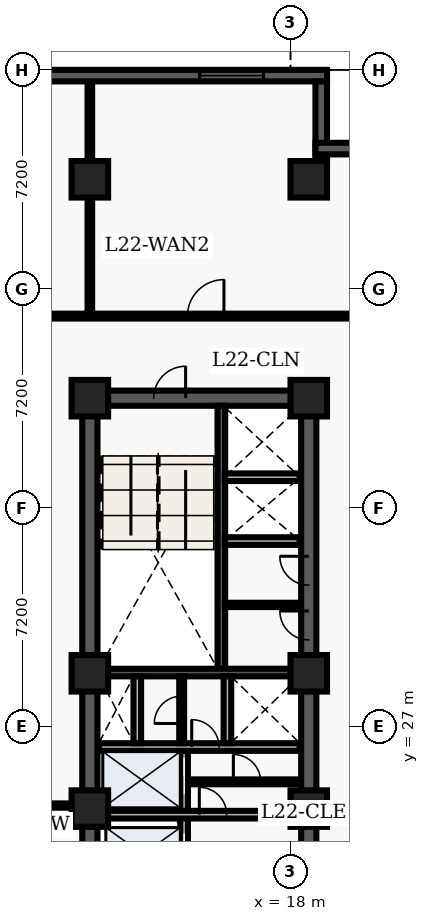
"""IFC4 building model, lengths in metres.
Left out: names, types, materials, properties, quantities, classifications, styles, units other than length and angle.
Written with IfcOpenShell. Run it as: python <this file> out.ifc"""

import sys

from ifc_helpers import new_model, entity, si_unit, converted_unit, direction, frame, origin_with_axes, origin_2d_with_axis, place, context, subcontext, project, spatial, polyline, rectangle, outline, extrude, element, fill, save


model = new_model("IFC4")
c1 = context("Model", 3, precision=1e-05, world=origin_with_axes(), true_north=direction((0.0, 1.0)))
c2 = subcontext(c1, "Body", "Model", "MODEL_VIEW")
j1 = project(units=[si_unit("LENGTHUNIT", "METRE"), converted_unit("PLANEANGLEUNIT", "DEGREE", entity("IfcPlaneAngleMeasure", 0.017), si_unit("PLANEANGLEUNIT", "RADIAN"), dimensions=[0, 0, 0, 0, 0, 0, 0])], contexts=[c1])
p1 = place(None, origin_with_axes())
s1 = spatial("IfcSite", under=j1, at=p1, CompositionType="ELEMENT")
p2 = place(p1, origin_with_axes())
s2 = spatial("IfcBuilding", under=s1, at=p2, CompositionType="ELEMENT")
p3 = place(p2, frame((0.0, 0.0, 93.0), z_axis=(0.0, 0.0, 1.0), x_axis=(1.0, 0.0, 0.0)))
s3 = spatial("IfcBuildingStorey", under=s2, at=p3, CompositionType="ELEMENT", Elevation=93.0)
p4 = place(p3, frame((11.4, 10.8, 0.0), z_axis=(0.0, 0.0, 1.0), x_axis=(0.0, 1.0, 0.0)))
e1 = element("IfcWall", 1, at=p4, inside=s3, PredefinedType="SHEAR", context=c2, shape_type="SweptSolid", body=[
    extrude(outline(polyline([(0.0, -0.25), (27.0, -0.25), (27.0, 0.25), (0.0, 0.25), (0.0, -0.25)])), origin_with_axes(), (0.0, 0.0, 1.0), 3.66),
])
p5 = place(p3, frame((11.4, 37.8, 0.0), z_axis=(0.0, 0.0, 1.0), x_axis=(1.0, 0.0, 0.0)))
e2 = element("IfcWall", 2, at=p5, inside=s3, PredefinedType="SHEAR", context=c2, shape_type="SweptSolid", body=[
    extrude(outline(polyline([(0.0, -0.25), (7.2, -0.25), (7.2, 0.25), (0.0, 0.25), (0.0, -0.25)])), origin_with_axes(), (0.0, 0.0, 1.0), 3.66),
])
p6 = place(p5, frame((2.625, 0.0, 0.0), z_axis=(0.0, 0.0, 1.0), x_axis=(1.0, 0.0, 0.0)))
e3 = element("IfcOpeningElement", 3, at=p6, cuts=e2, PredefinedType="OPENING", context=c2, shape_type="SweptSolid", body=[
    extrude(rectangle(XDim=1.05, YDim=0.52, at=origin_2d_with_axis()), origin_with_axes(), (0.0, 0.0, 1.0), 2.15),
])
p7 = place(p3, frame((18.6, 10.8, 0.0), z_axis=(0.0, 0.0, 1.0), x_axis=(0.0, 1.0, 0.0)))
e4 = element("IfcWall", 4, at=p7, inside=s3, PredefinedType="SHEAR", context=c2, shape_type="SweptSolid", body=[
    extrude(outline(polyline([(0.0, -0.25), (13.5, -0.25), (13.5, 0.25), (0.0, 0.25), (0.0, -0.25)])), origin_with_axes(), (0.0, 0.0, 1.0), 3.66),
])
p8 = place(p7, frame((11.125, 0.0, 0.0), z_axis=(0.0, 0.0, 1.0), x_axis=(1.0, 0.0, 0.0)))
e5 = element("IfcOpeningElement", 5, at=p8, cuts=e4, PredefinedType="OPENING", context=c2, shape_type="SweptSolid", body=[
    extrude(rectangle(XDim=1.05, YDim=0.52, at=origin_2d_with_axis()), origin_with_axes(), (0.0, 0.0, 1.0), 2.15),
])
p9 = place(p7, frame((2.575, 0.0, 0.0), z_axis=(0.0, 0.0, 1.0), x_axis=(1.0, 0.0, 0.0)))
e6 = element("IfcOpeningElement", 6, at=p9, cuts=e4, PredefinedType="OPENING", context=c2, shape_type="SweptSolid", body=[
    extrude(rectangle(XDim=0.95, YDim=0.52, at=origin_2d_with_axis()), origin_with_axes(), (0.0, 0.0, 1.0), 2.15),
])
p10 = place(p3, frame((18.6, 24.3, 0.0), z_axis=(0.0, 0.0, 1.0), x_axis=(0.0, 1.0, 0.0)))
e7 = element("IfcWall", 7, at=p10, inside=s3, PredefinedType="SHEAR", context=c2, shape_type="SweptSolid", body=[
    extrude(outline(polyline([(0.0, -0.25), (13.5, -0.25), (13.5, 0.25), (0.0, 0.25), (0.0, -0.25)])), origin_with_axes(), (0.0, 0.0, 1.0), 3.66),
])
p11 = place(p10, frame((6.025, 0.0, 0.0), z_axis=(0.0, 0.0, 1.0), x_axis=(1.0, 0.0, 0.0)))
e8 = element("IfcOpeningElement", 8, at=p11, cuts=e7, PredefinedType="OPENING", context=c2, shape_type="SweptSolid", body=[
    extrude(rectangle(XDim=0.95, YDim=0.52, at=origin_2d_with_axis()), origin_with_axes(), (0.0, 0.0, 1.0), 2.15),
])
p12 = place(p10, frame((7.825, 0.0, 0.0), z_axis=(0.0, 0.0, 1.0), x_axis=(1.0, 0.0, 0.0)))
e9 = element("IfcOpeningElement", 9, at=p12, cuts=e7, PredefinedType="OPENING", context=c2, shape_type="SweptSolid", body=[
    extrude(rectangle(XDim=0.95, YDim=0.52, at=origin_2d_with_axis()), origin_with_axes(), (0.0, 0.0, 1.0), 2.15),
])
p13 = place(p3, frame((15.725, 28.9, 0.0), z_axis=(0.0, 0.0, 1.0), x_axis=(0.0, 1.0, 0.0)))
e10 = element("IfcWall", 10, at=p13, inside=s3, PredefinedType="SHEAR", context=c2, shape_type="SweptSolid", body=[
    extrude(outline(polyline([(0.0, -0.125), (8.65, -0.125), (8.65, 0.125), (0.0, 0.125), (0.0, -0.125)])), origin_with_axes(), (0.0, 0.0, 1.0), 3.66),
])
p14 = place(p3, frame((11.65, 28.775, 0.0), z_axis=(0.0, 0.0, 1.0), x_axis=(1.0, 0.0, 0.0)))
e11 = element("IfcWall", 11, at=p14, inside=s3, PredefinedType="SHEAR", context=c2, shape_type="SweptSolid", body=[
    extrude(outline(polyline([(0.0, -0.125), (6.7, -0.125), (6.7, 0.125), (0.0, 0.125), (0.0, -0.125)])), origin_with_axes(), (0.0, 0.0, 1.0), 3.66),
])
p15 = place(p3, frame((14.5, 19.95, 0.0), z_axis=(0.0, 0.0, 1.0), x_axis=(0.0, 1.0, 0.0)))
e12 = element("IfcWall", 12, at=p15, inside=s3, PredefinedType="SOLIDWALL", context=c2, shape_type="SweptSolid", body=[
    extrude(outline(polyline([(0.0, -0.125), (6.25, -0.125), (6.25, 0.125), (0.0, 0.125), (0.0, -0.125)])), origin_with_axes(), (0.0, 0.0, 1.0), 2.7),
])
p16 = place(p15, frame((1.025, 0.0, 0.0), z_axis=(0.0, 0.0, 1.0), x_axis=(1.0, 0.0, 0.0)))
e13 = element("IfcOpeningElement", 13, at=p16, cuts=e12, PredefinedType="OPENING", context=c2, shape_type="SweptSolid", body=[
    extrude(rectangle(XDim=1.1, YDim=0.27, at=origin_2d_with_axis()), origin_with_axes(), (0.0, 0.0, 1.0), 2.15),
])
p17 = place(p15, frame((2.975, 0.0, 0.0), z_axis=(0.0, 0.0, 1.0), x_axis=(1.0, 0.0, 0.0)))
e14 = element("IfcOpeningElement", 14, at=p17, cuts=e12, PredefinedType="OPENING", context=c2, shape_type="SweptSolid", body=[
    extrude(rectangle(XDim=1.1, YDim=0.27, at=origin_2d_with_axis()), origin_with_axes(), (0.0, 0.0, 1.0), 2.15),
])
p18 = place(p15, frame((5.425, 0.0, 0.0), z_axis=(0.0, 0.0, 1.0), x_axis=(1.0, 0.0, 0.0)))
e15 = element("IfcOpeningElement", 15, at=p18, cuts=e12, PredefinedType="OPENING", context=c2, shape_type="SweptSolid", body=[
    extrude(rectangle(XDim=1.2, YDim=0.27, at=origin_2d_with_axis()), origin_with_axes(), (0.0, 0.0, 1.0), 2.15),
])
p19 = place(p3, frame((11.7, 24.1, 0.0), z_axis=(0.0, 0.0, 1.0), x_axis=(1.0, 0.0, 0.0)))
e16 = element("IfcWall", 16, at=p19, inside=s3, PredefinedType="SOLIDWALL", context=c2, shape_type="SweptSolid", body=[
    extrude(outline(polyline([(0.0, -0.125), (6.6, -0.125), (6.6, 0.125), (0.0, 0.125), (0.0, -0.125)])), origin_with_axes(), (0.0, 0.0, 1.0), 2.7),
])
p20 = place(p19, frame((3.75, 0.0, 0.0), z_axis=(0.0, 0.0, 1.0), x_axis=(1.0, 0.0, 0.0)))
e17 = element("IfcOpeningElement", 17, at=p20, cuts=e16, PredefinedType="OPENING", context=c2, shape_type="SweptSolid", body=[
    extrude(rectangle(XDim=0.9, YDim=0.27, at=origin_2d_with_axis()), origin_with_axes(), (0.0, 0.0, 1.0), 2.15),
])
p21 = place(p3, frame((11.7, 26.325, 0.0), z_axis=(0.0, 0.0, 1.0), x_axis=(1.0, 0.0, 0.0)))
e18 = element("IfcWall", 18, at=p21, inside=s3, PredefinedType="SOLIDWALL", context=c2, shape_type="SweptSolid", body=[
    extrude(outline(polyline([(0.0, -0.125), (6.6, -0.125), (6.6, 0.125), (0.0, 0.125), (0.0, -0.125)])), origin_with_axes(), (0.0, 0.0, 1.0), 2.7),
])
p22 = place(p21, frame((3.5, 0.0, 0.0), z_axis=(0.0, 0.0, 1.0), x_axis=(1.0, 0.0, 0.0)))
e19 = element("IfcOpeningElement", 19, at=p22, cuts=e18, PredefinedType="OPENING", context=c2, shape_type="SweptSolid", body=[
    extrude(rectangle(XDim=0.9, YDim=0.27, at=origin_2d_with_axis()), origin_with_axes(), (0.0, 0.0, 1.0), 2.15),
])
for number, where, z_axis, x_axis in (
    (20, (12.96, 26.45, 0.0), (0.0, 0.0, 1.0), (0.0, 1.0, 0.0)),
    (21, (15.925, 26.45, 0.0), (0.0, 0.0, 1.0), (0.0, 1.0, 0.0)),
):
    element("IfcWall", number, at=place(p3, frame(where, z_axis=z_axis, x_axis=x_axis)), inside=s3, PredefinedType="SOLIDWALL", context=c2, shape_type="SweptSolid", body=[
        extrude(outline(polyline([(0.0, -0.125), (2.2, -0.125), (2.2, 0.125), (0.0, 0.125), (0.0, -0.125)])), origin_with_axes(), (0.0, 0.0, 1.0), 2.7),
    ])
for number, where, z_axis, x_axis in (
    (22, (11.4, 24.3, 0.0), (0.0, 0.0, 1.0), (1.0, 0.0, 0.0)),
    (23, (11.4, 28.75, 0.0), (0.0, 0.0, 1.0), (1.0, 0.0, 0.0)),
    (24, (11.4, 37.8, 0.0), (0.0, 0.0, 1.0), (1.0, 0.0, 0.0)),
    (25, (11.4, 45.0, 0.0), (0.0, 0.0, 1.0), (1.0, 0.0, 0.0)),
    (26, (18.6, 24.3, 0.0), (0.0, 0.0, 1.0), (1.0, 0.0, 0.0)),
    (27, (18.6, 28.75, 0.0), (0.0, 0.0, 1.0), (1.0, 0.0, 0.0)),
    (28, (18.6, 37.8, 0.0), (0.0, 0.0, 1.0), (1.0, 0.0, 0.0)),
    (29, (18.6, 45.0, 0.0), (0.0, 0.0, 1.0), (1.0, 0.0, 0.0)),
):
    element("IfcColumn", number, at=place(p3, frame(where, z_axis=z_axis, x_axis=x_axis)), inside=s3, PredefinedType="COLUMN", context=c2, shape_type="SweptSolid", body=[
        extrude(rectangle(XDim=1.2, YDim=1.2, at=origin_2d_with_axis()), origin_with_axes(), (0.0, 0.0, 1.0), 3.9),
    ])
p23 = place(p3, frame((14.62, 25.18, 0.0), z_axis=(0.0, 0.0, 1.0), x_axis=(1.0, 0.0, 0.0)))
e30 = element("IfcWall", 30, at=p23, inside=s3, PredefinedType="PARTITIONING", context=c2, shape_type="SweptSolid", body=[
    extrude(outline(polyline([(0.0, -0.08), (3.68, -0.08), (3.68, 0.08), (0.0, 0.08), (0.0, -0.08)])), origin_with_axes(), (0.0, 0.0, 1.0), 2.7),
])
p24 = place(p23, frame((1.95, 0.0, 0.0), z_axis=(0.0, 0.0, 1.0), x_axis=(1.0, 0.0, 0.0)))
e31 = element("IfcOpeningElement", 31, at=p24, cuts=e30, PredefinedType="OPENING", context=c2, shape_type="SweptSolid", body=[
    extrude(rectangle(XDim=0.9, YDim=0.18, at=origin_2d_with_axis()), origin_with_axes(), (0.0, 0.0, 1.0), 2.15),
])
p25 = place(p3, frame((14.42, 26.45, 0.0), z_axis=(0.0, 0.0, 1.0), x_axis=(0.0, 1.0, 0.0)))
e32 = element("IfcWall", 32, at=p25, inside=s3, PredefinedType="PARTITIONING", context=c2, shape_type="SweptSolid", body=[
    extrude(outline(polyline([(0.0, -0.08), (2.2, -0.08), (2.2, 0.08), (0.0, 0.08), (0.0, -0.08)])), origin_with_axes(), (0.0, 0.0, 1.0), 2.7),
])
p26 = place(p25, frame((1.1, 0.0, 0.0), z_axis=(0.0, 0.0, 1.0), x_axis=(1.0, 0.0, 0.0)))
e33 = element("IfcOpeningElement", 33, at=p26, cuts=e32, PredefinedType="OPENING", context=c2, shape_type="SweptSolid", body=[
    extrude(rectangle(XDim=0.9, YDim=0.18, at=origin_2d_with_axis()), origin_with_axes(), (0.0, 0.0, 1.0), 2.15),
])
for number, where, z_axis, x_axis in (
    (34, (15.84, 33.1, 0.0), (0.0, 0.0, 1.0), (1.0, 0.0, 0.0)),
    (35, (15.84, 35.2, 0.0), (0.0, 0.0, 1.0), (1.0, 0.0, 0.0)),
):
    element("IfcWall", number, at=place(p3, frame(where, z_axis=z_axis, x_axis=x_axis)), inside=s3, PredefinedType="SOLIDWALL", context=c2, shape_type="SweptSolid", body=[
        extrude(outline(polyline([(0.0, -0.125), (2.46, -0.125), (2.46, 0.125), (0.0, 0.125), (0.0, -0.125)])), origin_with_axes(), (0.0, 0.0, 1.0), 2.7),
    ])
p27 = place(p3, frame((15.84, 31.0, 0.0), z_axis=(0.0, 0.0, 1.0), x_axis=(1.0, 0.0, 0.0)))
e36 = element("IfcWall", 36, at=p27, inside=s3, PredefinedType="PARTITIONING", context=c2, shape_type="SweptSolid", body=[
    extrude(outline(polyline([(0.0, -0.07), (2.46, -0.07), (2.46, 0.07), (0.0, 0.07), (0.0, -0.07)])), origin_with_axes(), (0.0, 0.0, 1.0), 2.7),
])
p28 = place(p3, frame((9.52, 24.4, 0.0), z_axis=(0.0, 0.0, 1.0), x_axis=(1.0, 0.0, 0.0)))
e37 = element("IfcWall", 37, at=p28, inside=s3, PredefinedType="PARTITIONING", context=c2, shape_type="SweptSolid", body=[
    extrude(outline(polyline([(0.0, -0.07), (1.58, -0.07), (1.58, 0.07), (0.0, 0.07), (0.0, -0.07)])), origin_with_axes(), (0.0, 0.0, 1.0), 2.7),
])
p29 = place(p3, frame((2.6, 40.5, 0.0), z_axis=(0.0, 0.0, 1.0), x_axis=(1.0, 0.0, 0.0)))
e38 = element("IfcWall", 38, at=p29, inside=s3, PredefinedType="PARTITIONING", context=c2, shape_type="SweptSolid", body=[
    extrude(outline(polyline([(0.0, -0.08), (18.65, -0.08), (18.65, 0.08), (0.0, 0.08), (0.0, -0.08)])), origin_with_axes(), (0.0, 0.0, 1.0), 2.7),
])
p30 = place(p29, frame((5.275, 0.0, 0.0), z_axis=(0.0, 0.0, 1.0), x_axis=(1.0, 0.0, 0.0)))
e39 = element("IfcOpeningElement", 39, at=p30, cuts=e38, PredefinedType="OPENING", context=c2, shape_type="SweptSolid", body=[
    extrude(rectangle(XDim=1.0, YDim=0.18, at=origin_2d_with_axis()), origin_with_axes(), (0.0, 0.0, 1.0), 2.15),
])
p31 = place(p29, frame((12.61, 0.0, 0.0), z_axis=(0.0, 0.0, 1.0), x_axis=(1.0, 0.0, 0.0)))
e40 = element("IfcOpeningElement", 40, at=p31, cuts=e38, PredefinedType="OPENING", context=c2, shape_type="SweptSolid", body=[
    extrude(rectangle(XDim=1.2, YDim=0.18, at=origin_2d_with_axis()), origin_with_axes(), (0.0, 0.0, 1.0), 2.2),
])
p32 = place(p3, frame((11.4, 40.6, 0.0), z_axis=(0.0, 0.0, 1.0), x_axis=(0.0, 1.0, 0.0)))
e41 = element("IfcWall", 41, at=p32, inside=s3, PredefinedType="PARTITIONING", context=c2, shape_type="SweptSolid", body=[
    extrude(outline(polyline([(0.0, -0.075), (7.64, -0.075), (7.64, 0.075), (0.0, 0.075), (0.0, -0.075)])), origin_with_axes(), (0.0, 0.0, 1.0), 2.7),
])
p33 = place(p3, frame((2.78, 48.41, 0.0), z_axis=(0.0, 0.0, 1.0), x_axis=(1.0, 0.0, 0.0)))
e42 = element("IfcWall", 42, at=p33, inside=s3, PredefinedType="SOLIDWALL", context=c2, shape_type="SweptSolid", body=[
    extrude(outline(polyline([(0.0, -0.19), (16.42, -0.19), (16.42, 0.19), (0.0, 0.19), (0.0, -0.19)])), origin_with_axes(), (0.0, 0.0, 1.0), 3.66),
])
p34 = place(p33, frame((3.137, 0.0, 0.45), z_axis=(0.0, 0.0, 1.0), x_axis=(1.0, 0.0, 0.0)))
e43 = element("IfcOpeningElement", 43, at=p34, cuts=e42, PredefinedType="OPENING", context=c2, shape_type="SweptSolid", body=[
    extrude(rectangle(XDim=2.1, YDim=0.4, at=origin_2d_with_axis()), origin_with_axes(), (0.0, 0.0, 1.0), 2.2),
])
p35 = place(p33, frame((13.283, 0.0, 0.45), z_axis=(0.0, 0.0, 1.0), x_axis=(1.0, 0.0, 0.0)))
e44 = element("IfcOpeningElement", 44, at=p35, cuts=e42, PredefinedType="OPENING", context=c2, shape_type="SweptSolid", body=[
    extrude(rectangle(XDim=2.1, YDim=0.4, at=origin_2d_with_axis()), origin_with_axes(), (0.0, 0.0, 1.0), 2.2),
])
p36 = place(p3, frame((19.01, 48.22, 0.0), z_axis=(0.0, 0.0, 1.0), x_axis=(0.0, -1.0, 0.0)))
e45 = element("IfcWall", 45, at=p36, inside=s3, PredefinedType="SOLIDWALL", context=c2, shape_type="SweptSolid", body=[
    extrude(outline(polyline([(0.0, -0.19), (2.56, -0.19), (2.56, 0.19), (0.0, 0.19), (0.0, -0.19)])), origin_with_axes(), (0.0, 0.0, 1.0), 3.66),
])
p37 = place(p3, frame((18.82, 46.01, 0.0), z_axis=(0.0, 0.0, 1.0), x_axis=(1.0, 0.0, 0.0)))
e46 = element("IfcWall", 46, at=p37, inside=s3, PredefinedType="SOLIDWALL", context=c2, shape_type="SweptSolid", body=[
    extrude(outline(polyline([(0.0, -0.19), (2.78, -0.19), (2.78, 0.19), (0.0, 0.19), (0.0, -0.19)])), origin_with_axes(), (0.0, 0.0, 1.0), 3.66),
])
p38 = place(p15, frame((2.975, 0.0, 0.0), z_axis=(0.0, 0.0, 1.0), x_axis=(1.0, 0.0, 0.0)))
e47 = element("IfcDoor", 47, at=p38, inside=s3, OperationType="SLIDING_TO_RIGHT", PredefinedType="DOOR", context=c2, shape_type="SweptSolid", body=[
    extrude(rectangle(XDim=1.1, YDim=0.09, at=origin_2d_with_axis()), origin_with_axes(), (0.0, 0.0, 1.0), 2.15),
])
fill(e14, e47)
p39 = place(p15, frame((5.425, 0.0, 0.0), z_axis=(0.0, 0.0, 1.0), x_axis=(1.0, 0.0, 0.0)))
e48 = element("IfcDoor", 48, at=p39, inside=s3, OperationType="DOUBLE_DOOR_SLIDING", PredefinedType="DOOR", context=c2, shape_type="SweptSolid", body=[
    extrude(rectangle(XDim=1.2, YDim=0.09, at=origin_2d_with_axis()), origin_with_axes(), (0.0, 0.0, 1.0), 2.15),
])
fill(e15, e48)
p40 = place(p5, frame((2.625, 0.0, 0.0), z_axis=(0.0, 0.0, 1.0), x_axis=(1.0, 0.0, 0.0)))
e49 = element("IfcDoor", 49, at=p40, inside=s3, OperationType="SINGLE_SWING_RIGHT", PredefinedType="DOOR", context=c2, shape_type="SweptSolid", body=[
    extrude(rectangle(XDim=1.05, YDim=0.09, at=origin_2d_with_axis()), origin_with_axes(), (0.0, 0.0, 1.0), 2.15),
])
fill(e3, e49)
p41 = place(p21, frame((3.5, 0.0, 0.0), z_axis=(0.0, 0.0, 1.0), x_axis=(1.0, 0.0, 0.0)))
e50 = element("IfcDoor", 50, at=p41, inside=s3, OperationType="SINGLE_SWING_LEFT", PredefinedType="DOOR", context=c2, shape_type="SweptSolid", body=[
    extrude(rectangle(XDim=0.9, YDim=0.09, at=origin_2d_with_axis()), origin_with_axes(), (0.0, 0.0, 1.0), 2.15),
])
fill(e19, e50)
p42 = place(p25, frame((1.1, 0.0, 0.0), z_axis=(0.0, 0.0, 1.0), x_axis=(1.0, 0.0, 0.0)))
e51 = element("IfcDoor", 51, at=p42, inside=s3, OperationType="SINGLE_SWING_LEFT", PredefinedType="DOOR", context=c2, shape_type="SweptSolid", body=[
    extrude(rectangle(XDim=0.9, YDim=0.09, at=origin_2d_with_axis()), origin_with_axes(), (0.0, 0.0, 1.0), 2.15),
])
fill(e33, e51)
p43 = place(p19, frame((3.75, 0.0, 0.0), z_axis=(0.0, 0.0, 1.0), x_axis=(1.0, 0.0, 0.0)))
e52 = element("IfcDoor", 52, at=p43, inside=s3, OperationType="SINGLE_SWING_LEFT", PredefinedType="DOOR", context=c2, shape_type="SweptSolid", body=[
    extrude(rectangle(XDim=0.9, YDim=0.09, at=origin_2d_with_axis()), origin_with_axes(), (0.0, 0.0, 1.0), 2.15),
])
fill(e17, e52)
p44 = place(p23, frame((1.95, 0.0, 0.0), z_axis=(0.0, 0.0, 1.0), x_axis=(1.0, 0.0, 0.0)))
e53 = element("IfcDoor", 53, at=p44, inside=s3, OperationType="SINGLE_SWING_LEFT", PredefinedType="DOOR", context=c2, shape_type="SweptSolid", body=[
    extrude(rectangle(XDim=0.9, YDim=0.09, at=origin_2d_with_axis()), origin_with_axes(), (0.0, 0.0, 1.0), 2.15),
])
fill(e31, e53)
p45 = place(p10, frame((6.025, 0.0, 0.0), z_axis=(0.0, 0.0, 1.0), x_axis=(1.0, 0.0, 0.0)))
e54 = element("IfcDoor", 54, at=p45, inside=s3, OperationType="SINGLE_SWING_RIGHT", PredefinedType="DOOR", context=c2, shape_type="SweptSolid", body=[
    extrude(rectangle(XDim=0.95, YDim=0.09, at=origin_2d_with_axis()), origin_with_axes(), (0.0, 0.0, 1.0), 2.15),
])
fill(e8, e54)
p46 = place(p10, frame((7.825, 0.0, 0.0), z_axis=(0.0, 0.0, 1.0), x_axis=(1.0, 0.0, 0.0)))
e55 = element("IfcDoor", 55, at=p46, inside=s3, OperationType="SINGLE_SWING_RIGHT", PredefinedType="DOOR", context=c2, shape_type="SweptSolid", body=[
    extrude(rectangle(XDim=0.95, YDim=0.09, at=origin_2d_with_axis()), origin_with_axes(), (0.0, 0.0, 1.0), 2.15),
])
fill(e9, e55)
p47 = place(p29, frame((12.61, 0.0, 0.0), z_axis=(0.0, 0.0, 1.0), x_axis=(1.0, 0.0, 0.0)))
e56 = element("IfcDoor", 56, at=p47, inside=s3, OperationType="SINGLE_SWING_RIGHT", PredefinedType="DOOR", context=c2, shape_type="SweptSolid", body=[
    extrude(rectangle(XDim=1.2, YDim=0.09, at=origin_2d_with_axis()), origin_with_axes(), (0.0, 0.0, 1.0), 2.2),
])
fill(e40, e56)
p48 = place(p33, frame((13.283, 0.0, 0.45), z_axis=(0.0, 0.0, 1.0), x_axis=(1.0, 0.0, 0.0)))
e57 = element("IfcWindow", 57, at=p48, inside=s3, PredefinedType="WINDOW", context=c2, shape_type="SweptSolid", body=[
    extrude(rectangle(XDim=2.1, YDim=0.09, at=origin_2d_with_axis()), origin_with_axes(), (0.0, 0.0, 1.0), 2.2),
])
fill(e44, e57)
save(model, sys.argv[1])
